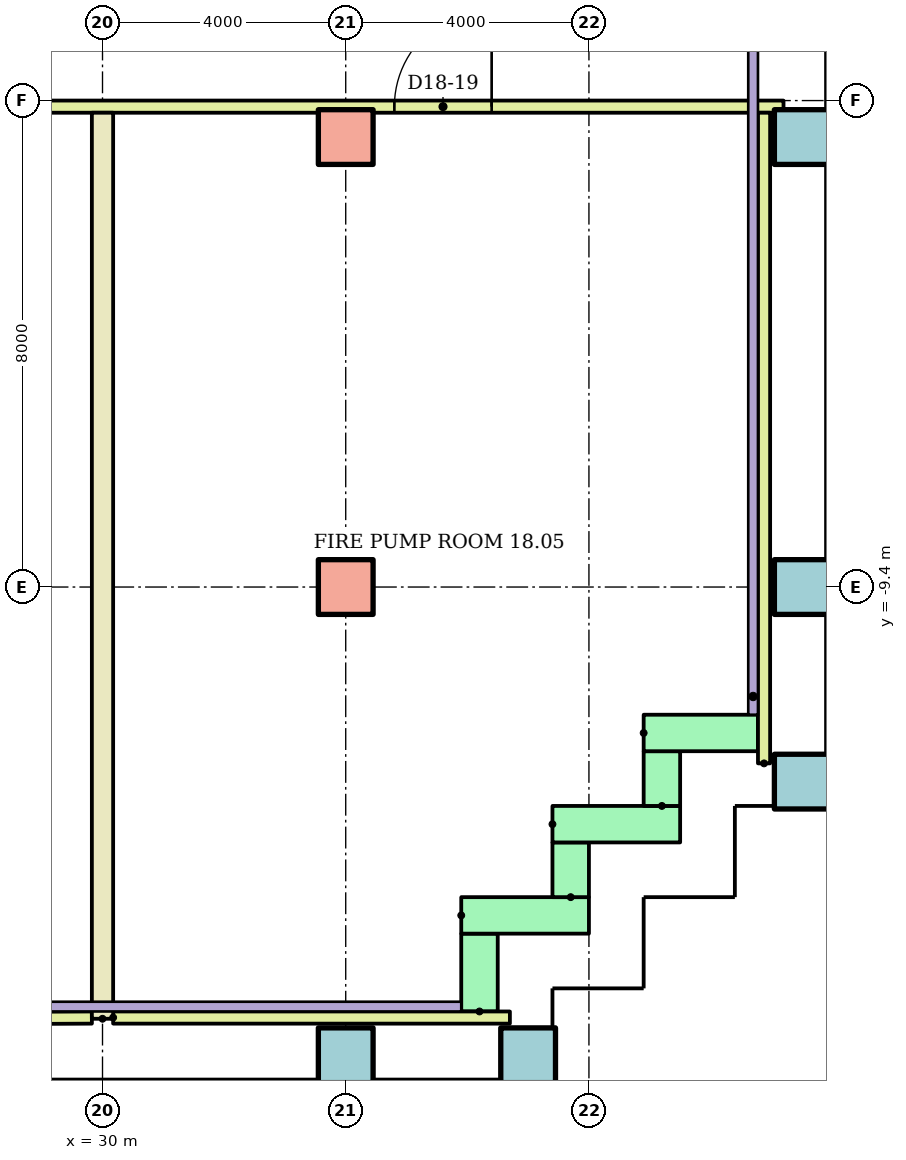
"""IFC4 building model, lengths in metres.
Left out: names, types, materials, properties, quantities, classifications, styles, units other than length and angle.
Written with IfcOpenShell. Run it as: python <this file> out.ifc"""

import sys

from ifc_helpers import new_model, si_unit, direction, frame, frame_2d, origin, origin_2d, place, context, subcontext, project, spatial, rectangle, hollow_rectangle, extrude, element, fill, save


model = new_model("IFC4")
c1 = context("Model", 3, precision=1e-05, world=origin(), true_north=direction((0.0, 1.0)))
c2 = subcontext(c1, "Body", "Model", "MODEL_VIEW")
j1 = project(units=[si_unit("LENGTHUNIT", "METRE"), si_unit("PLANEANGLEUNIT", "RADIAN")], contexts=[c1])
p1 = place(None, origin())
s1 = spatial("IfcSite", under=j1, at=p1, CompositionType="ELEMENT")
p2 = place(p1, origin())
s2 = spatial("IfcBuilding", under=s1, at=p2, CompositionType="ELEMENT")
p3 = place(p2, frame((0.0, 0.0, 73.6)))
s3 = spatial("IfcBuildingStorey", under=s2, at=p3, CompositionType="ELEMENT", Elevation=73.6)
for number, where in (
    (1, (34.0, -17.1, 0.0)),
    (2, (37.0, -17.1, 0.0)),
    (3, (41.5, -12.6, 0.0)),
):
    element("IfcColumn", number, at=place(p3, frame(where)), inside=s3, PredefinedType="COLUMN", context=c2, shape_type="SweptSolid", body=[
        extrude(hollow_rectangle(XDim=0.9, YDim=0.9, WallThickness=0.045, at=origin_2d()), origin(), (0.0, 0.0, 1.0), 3.9),
    ])
p4 = place(p3, frame((34.0, -9.4, 0.0)))
e4 = element("IfcColumn", 4, at=p4, inside=s3, PredefinedType="COLUMN", context=c2, shape_type="SweptSolid", body=[
    extrude(rectangle(XDim=0.9, YDim=0.9, at=origin_2d()), origin(), (0.0, 0.0, 1.0), 3.9),
])
p5 = place(p3, frame((41.5, -9.4, 0.0)))
e5 = element("IfcColumn", 5, at=p5, inside=s3, PredefinedType="COLUMN", context=c2, shape_type="SweptSolid", body=[
    extrude(hollow_rectangle(XDim=0.9, YDim=0.9, WallThickness=0.045, at=origin_2d()), origin(), (0.0, 0.0, 1.0), 3.9),
])
p6 = place(p3, frame((34.0, -2.0, 0.0)))
e6 = element("IfcColumn", 6, at=p6, inside=s3, PredefinedType="COLUMN", context=c2, shape_type="SweptSolid", body=[
    extrude(rectangle(XDim=0.9, YDim=0.9, at=origin_2d()), origin(), (0.0, 0.0, 1.0), 3.9),
])
p7 = place(p3, frame((41.5, -2.0, 0.0)))
e7 = element("IfcColumn", 7, at=p7, inside=s3, PredefinedType="COLUMN", context=c2, shape_type="SweptSolid", body=[
    extrude(hollow_rectangle(XDim=0.9, YDim=0.9, WallThickness=0.045, at=origin_2d()), origin(), (0.0, 0.0, 1.0), 3.9),
])
p8 = place(p3, frame((36.2, -16.38, 0.0), z_axis=(0.0, 0.0, 1.0), x_axis=(0.0, 1.0, 0.0)))
e8 = element("IfcWall", 8, at=p8, inside=s3, PredefinedType="STANDARD", context=c2, shape_type="SweptSolid", body=[
    extrude(rectangle(XDim=1.28, YDim=0.6, at=frame_2d((0.64, 0.0))), origin(), (0.0, 0.0, 1.0), 3.62),
])
p9 = place(p3, frame((35.9, -14.8, 0.0)))
e9 = element("IfcWall", 9, at=p9, inside=s3, PredefinedType="STANDARD", context=c2, shape_type="SweptSolid", body=[
    extrude(rectangle(XDim=2.1, YDim=0.6, at=frame_2d((1.05, 0.0))), origin(), (0.0, 0.0, 1.0), 3.62),
])
p10 = place(p3, frame((37.7, -14.5, 0.0), z_axis=(0.0, 0.0, 1.0), x_axis=(0.0, 1.0, 0.0)))
e10 = element("IfcWall", 10, at=p10, inside=s3, PredefinedType="STANDARD", context=c2, shape_type="SweptSolid", body=[
    extrude(rectangle(XDim=0.9, YDim=0.6, at=frame_2d((0.45, 0.0))), origin(), (0.0, 0.0, 1.0), 3.62),
])
p11 = place(p3, frame((37.4, -13.3, 0.0)))
e11 = element("IfcWall", 11, at=p11, inside=s3, PredefinedType="STANDARD", context=c2, shape_type="SweptSolid", body=[
    extrude(rectangle(XDim=2.1, YDim=0.6, at=frame_2d((1.05, 0.0))), origin(), (0.0, 0.0, 1.0), 3.62),
])
p12 = place(p3, frame((39.2, -13.0, 0.0), z_axis=(0.0, 0.0, 1.0), x_axis=(0.0, 1.0, 0.0)))
e12 = element("IfcWall", 12, at=p12, inside=s3, PredefinedType="STANDARD", context=c2, shape_type="SweptSolid", body=[
    extrude(rectangle(XDim=0.9, YDim=0.6, at=frame_2d((0.45, 0.0))), origin(), (0.0, 0.0, 1.0), 3.62),
])
p13 = place(p3, frame((38.9, -11.8, 0.0)))
e13 = element("IfcWall", 13, at=p13, inside=s3, PredefinedType="STANDARD", context=c2, shape_type="SweptSolid", body=[
    extrude(rectangle(XDim=1.88, YDim=0.6, at=frame_2d((0.94, 0.0))), origin(), (0.0, 0.0, 1.0), 3.62),
])
p14 = place(p3, frame((-28.4, -1.5, 0.0)))
e14 = element("IfcWall", 14, at=p14, inside=s3, PredefinedType="PARTITIONING", context=c2, shape_type="SweptSolid", body=[
    extrude(rectangle(XDim=69.6, YDim=0.2, at=frame_2d((34.8, 0.0))), origin(), (0.0, 0.0, 1.0), 3.62),
])
p15 = place(p14, frame((7.2, 0.0, 0.0)))
e15 = element("IfcOpeningElement", 15, at=p15, cuts=e14, PredefinedType="OPENING", context=c2, shape_type="SweptSolid", body=[
    extrude(rectangle(XDim=1.0, YDim=2.4, at=frame_2d((0.5, 1.2))), frame((0.0, 0.11, 0.0), z_axis=(0.0, -1.0, 0.0), x_axis=(1.0, 0.0, 0.0)), (0.0, 0.0, 1.0), 0.22),
])
p16 = place(p14, frame((20.0, 0.0, 0.0)))
e16 = element("IfcOpeningElement", 16, at=p16, cuts=e14, PredefinedType="OPENING", context=c2, shape_type="SweptSolid", body=[
    extrude(rectangle(XDim=1.5, YDim=2.1, at=frame_2d((0.75, 1.05))), frame((0.0, 0.11, 0.0), z_axis=(0.0, -1.0, 0.0), x_axis=(1.0, 0.0, 0.0)), (0.0, 0.0, 1.0), 0.22),
])
p17 = place(p14, frame((34.6, 0.0, 0.0)))
e17 = element("IfcOpeningElement", 17, at=p17, cuts=e14, PredefinedType="OPENING", context=c2, shape_type="SweptSolid", body=[
    extrude(rectangle(XDim=1.5, YDim=2.1, at=frame_2d((0.75, 1.05))), frame((0.0, 0.11, 0.0), z_axis=(0.0, -1.0, 0.0), x_axis=(1.0, 0.0, 0.0)), (0.0, 0.0, 1.0), 0.22),
])
p18 = place(p14, frame((49.6, 0.0, 0.0)))
e18 = element("IfcOpeningElement", 18, at=p18, cuts=e14, PredefinedType="OPENING", context=c2, shape_type="SweptSolid", body=[
    extrude(rectangle(XDim=1.6, YDim=2.4, at=frame_2d((0.8, 1.2))), frame((0.0, 0.11, 0.0), z_axis=(0.0, -1.0, 0.0), x_axis=(1.0, 0.0, 0.0)), (0.0, 0.0, 1.0), 0.22),
])
p19 = place(p14, frame((63.2, 0.0, 0.0)))
e19 = element("IfcOpeningElement", 19, at=p19, cuts=e14, PredefinedType="OPENING", context=c2, shape_type="SweptSolid", body=[
    extrude(rectangle(XDim=1.6, YDim=2.4, at=frame_2d((0.8, 1.2))), frame((0.0, 0.11, 0.0), z_axis=(0.0, -1.0, 0.0), x_axis=(1.0, 0.0, 0.0)), (0.0, 0.0, 1.0), 0.22),
])
p20 = place(p3, frame((25.85, -16.5, 0.0), z_axis=(0.0, 0.0, 1.0), x_axis=(0.999987316845, 0.005036481787, 0.0)))
e20 = element("IfcWall", 20, at=p20, inside=s3, PredefinedType="PARTITIONING", context=c2, shape_type="SweptSolid", body=[
    extrude(rectangle(XDim=3.975, YDim=0.2, at=frame_2d((1.987, 0.0))), origin(), (0.0, 0.0, 1.0), 3.62),
])
p21 = place(p3, frame((30.175, -16.48, 0.0)))
e21 = element("IfcWall", 21, at=p21, inside=s3, PredefinedType="PARTITIONING", context=c2, shape_type="SweptSolid", body=[
    extrude(rectangle(XDim=6.525, YDim=0.2, at=frame_2d((3.262, 0.0))), origin(), (0.0, 0.0, 1.0), 3.62),
])
p22 = place(p3, frame((40.88, -12.3, 0.0), z_axis=(0.0, 0.0, 1.0), x_axis=(0.0, 1.0, 0.0)))
e22 = element("IfcWall", 22, at=p22, inside=s3, PredefinedType="PARTITIONING", context=c2, shape_type="SweptSolid", body=[
    extrude(rectangle(XDim=10.7, YDim=0.2, at=frame_2d((5.35, 0.0))), origin(), (0.0, 0.0, 1.0), 3.62),
])
p23 = place(p3, frame((30.0, -16.5, 0.0), z_axis=(0.0, 0.0, 1.0), x_axis=(0.0, 1.0, 0.0)))
e23 = element("IfcWall", 23, at=p23, inside=s3, PredefinedType="PARTITIONING", context=c2, shape_type="SweptSolid", body=[
    extrude(rectangle(XDim=14.9, YDim=0.35, at=frame_2d((7.45, 0.0))), origin(), (0.0, 0.0, 1.0), 3.62),
])
p24 = place(p19, origin())
e24 = element("IfcDoor", 24, at=p24, inside=s3, OperationType="DOUBLE_DOOR_SINGLE_SWING", PredefinedType="DOOR", context=c2, shape_type="SweptSolid", body=[
    extrude(rectangle(XDim=1.6, YDim=2.4, at=frame_2d((0.8, 1.2))), frame((0.0, 0.025, 0.0), z_axis=(0.0, -1.0, 0.0), x_axis=(1.0, 0.0, 0.0)), (0.0, 0.0, 1.0), 0.05),
])
fill(e19, e24)
save(model, sys.argv[1])
